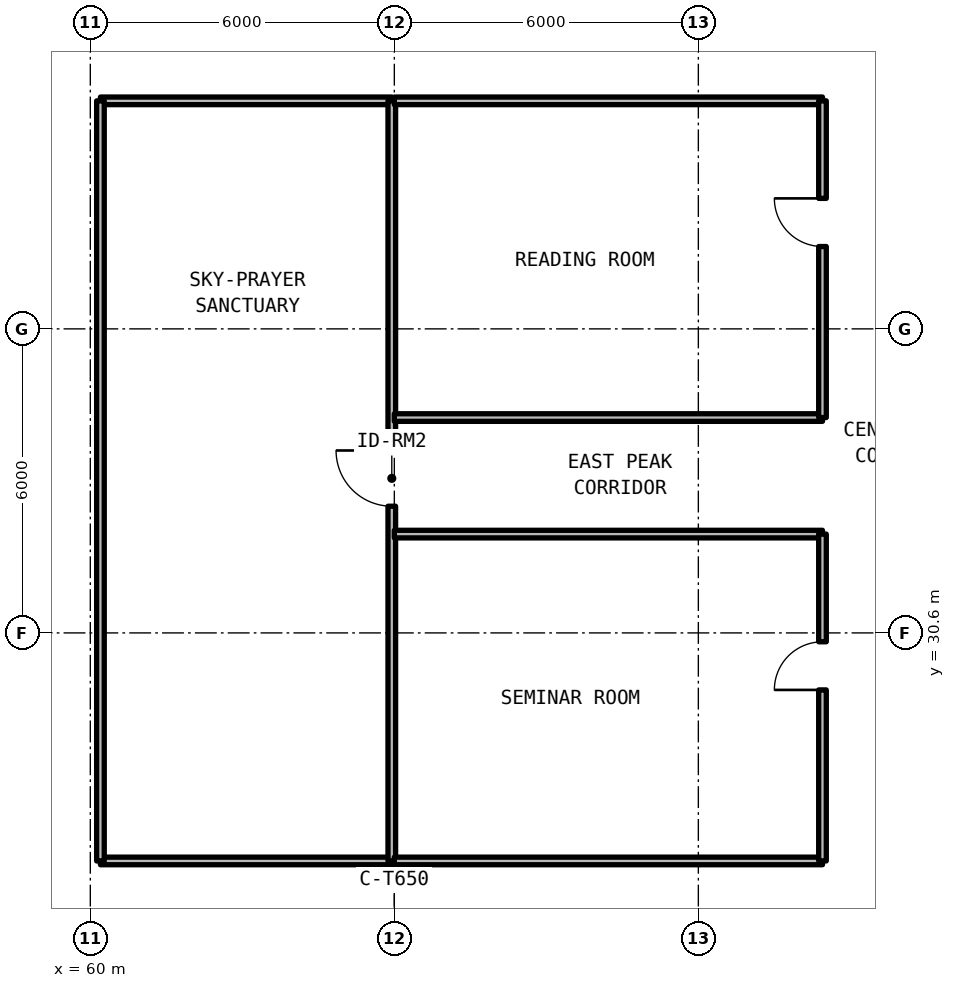
"""IFC4 building model, lengths in metres.
Left out: names, types, materials, properties, quantities, classifications, styles, units other than length and angle.
Written with IfcOpenShell. Run it as: python <this file> out.ifc"""

import sys

from ifc_helpers import new_model, si_unit, direction, frame, frame_2d, origin, place, context, subcontext, project, spatial, rectangle, extrude, element, fill, save


model = new_model("IFC4")
c1 = context("Model", 3, precision=1e-05, world=origin(), true_north=direction((0.0, 1.0)))
c2 = subcontext(c1, "Body", "Model", "MODEL_VIEW")
j1 = project(units=[si_unit("LENGTHUNIT", "METRE"), si_unit("PLANEANGLEUNIT", "RADIAN")], contexts=[c1])
p1 = place(None, origin())
s1 = spatial("IfcSite", under=j1, at=p1, CompositionType="ELEMENT")
p2 = place(p1, origin())
s2 = spatial("IfcBuilding", under=s1, at=p2, CompositionType="ELEMENT")
p3 = place(p2, frame((0.0, 0.0, 246.18)))
s3 = spatial("IfcBuildingStorey", under=s2, at=p3, CompositionType="ELEMENT", Elevation=246.18)
for number, where, z_axis, x_axis in (
    (1, (60.2, 26.1, 0.0), (0.0, 0.0, 1.0), (1.0, 0.0, 0.0)),
    (2, (60.2, 41.1, 0.0), (0.0, 0.0, 1.0), (1.0, 0.0, 0.0)),
):
    element("IfcWall", number, at=place(p3, frame(where, z_axis=z_axis, x_axis=x_axis)), inside=s3, PredefinedType="SOLIDWALL", context=c2, shape_type="SweptSolid", body=[
        extrude(rectangle(XDim=5.75, YDim=0.15, at=frame_2d((2.875, 0.0))), origin(), (0.0, 0.0, 1.0), 2.63),
    ])
p4 = place(p3, frame((60.2, 26.1, 0.0), z_axis=(0.0, 0.0, 1.0), x_axis=(0.0, 1.0, 0.0)))
e3 = element("IfcWall", 3, at=p4, inside=s3, PredefinedType="SOLIDWALL", context=c2, shape_type="SweptSolid", body=[
    extrude(rectangle(XDim=15.0, YDim=0.15, at=frame_2d((7.5, 0.0))), origin(), (0.0, 0.0, 1.0), 2.63),
])
p5 = place(p3, frame((65.95, 26.1, 0.0), z_axis=(0.0, 0.0, 1.0), x_axis=(0.0, 1.0, 0.0)))
e4 = element("IfcWall", 4, at=p5, inside=s3, PredefinedType="SOLIDWALL", context=c2, shape_type="SweptSolid", body=[
    extrude(rectangle(XDim=15.0, YDim=0.15, at=frame_2d((7.5, 0.0))), origin(), (0.0, 0.0, 1.0), 2.63),
])
p6 = place(p5, frame((7.0, 0.0, 0.0)))
e5 = element("IfcOpeningElement", 5, at=p6, cuts=e4, PredefinedType="OPENING", context=c2, shape_type="SweptSolid", body=[
    extrude(rectangle(XDim=1.1, YDim=2.15, at=frame_2d((0.55, 1.075))), frame((0.0, 0.085, 0.0), z_axis=(0.0, -1.0, 0.0), x_axis=(1.0, 0.0, 0.0)), (0.0, 0.0, 1.0), 0.17),
])
for number, where, z_axis, x_axis in (
    (6, (66.0, 26.1, 0.0), (0.0, 0.0, 1.0), (1.0, 0.0, 0.0)),
    (7, (66.0, 32.55, 0.0), (0.0, 0.0, 1.0), (1.0, 0.0, 0.0)),
):
    element("IfcWall", number, at=place(p3, frame(where, z_axis=z_axis, x_axis=x_axis)), inside=s3, PredefinedType="SOLIDWALL", context=c2, shape_type="SweptSolid", body=[
        extrude(rectangle(XDim=8.45, YDim=0.15, at=frame_2d((4.225, 0.0))), origin(), (0.0, 0.0, 1.0), 2.63),
    ])
p7 = place(p3, frame((74.45, 26.1, 0.0), z_axis=(0.0, 0.0, 1.0), x_axis=(0.0, 1.0, 0.0)))
e8 = element("IfcWall", 8, at=p7, inside=s3, PredefinedType="SOLIDWALL", context=c2, shape_type="SweptSolid", body=[
    extrude(rectangle(XDim=6.45, YDim=0.15, at=frame_2d((3.225, 0.0))), origin(), (0.0, 0.0, 1.0), 2.63),
])
p8 = place(p7, frame((3.375, 0.0, 0.0)))
e9 = element("IfcOpeningElement", 9, at=p8, cuts=e8, PredefinedType="OPENING", context=c2, shape_type="SweptSolid", body=[
    extrude(rectangle(XDim=0.95, YDim=2.15, at=frame_2d((0.475, 1.075))), frame((0.0, 0.085, 0.0), z_axis=(0.0, -1.0, 0.0), x_axis=(1.0, 0.0, 0.0)), (0.0, 0.0, 1.0), 0.17),
])
for number, where, z_axis, x_axis in (
    (10, (66.0, 34.85, 0.0), (0.0, 0.0, 1.0), (1.0, 0.0, 0.0)),
    (11, (66.0, 41.1, 0.0), (0.0, 0.0, 1.0), (1.0, 0.0, 0.0)),
):
    element("IfcWall", number, at=place(p3, frame(where, z_axis=z_axis, x_axis=x_axis)), inside=s3, PredefinedType="SOLIDWALL", context=c2, shape_type="SweptSolid", body=[
        extrude(rectangle(XDim=8.45, YDim=0.15, at=frame_2d((4.225, 0.0))), origin(), (0.0, 0.0, 1.0), 2.63),
    ])
p9 = place(p3, frame((74.45, 34.85, 0.0), z_axis=(0.0, 0.0, 1.0), x_axis=(0.0, 1.0, 0.0)))
e12 = element("IfcWall", 12, at=p9, inside=s3, PredefinedType="SOLIDWALL", context=c2, shape_type="SweptSolid", body=[
    extrude(rectangle(XDim=6.25, YDim=0.15, at=frame_2d((3.125, 0.0))), origin(), (0.0, 0.0, 1.0), 2.63),
])
p10 = place(p9, frame((3.375, 0.0, 0.0)))
e13 = element("IfcOpeningElement", 13, at=p10, cuts=e12, PredefinedType="OPENING", context=c2, shape_type="SweptSolid", body=[
    extrude(rectangle(XDim=0.95, YDim=2.15, at=frame_2d((0.475, 1.075))), frame((0.0, 0.085, 0.0), z_axis=(0.0, -1.0, 0.0), x_axis=(1.0, 0.0, 0.0)), (0.0, 0.0, 1.0), 0.17),
])
p11 = place(p6, origin())
e14 = element("IfcDoor", 14, at=p11, inside=s3, OperationType="SINGLE_SWING_RIGHT", PredefinedType="DOOR", context=c2, shape_type="SweptSolid", body=[
    extrude(rectangle(XDim=1.1, YDim=2.15, at=frame_2d((0.55, 1.075))), frame((0.0, 0.025, 0.0), z_axis=(0.0, -1.0, 0.0), x_axis=(1.0, 0.0, 0.0)), (0.0, 0.0, 1.0), 0.05),
])
fill(e5, e14)
p12 = place(p8, origin())
e15 = element("IfcDoor", 15, at=p12, inside=s3, OperationType="SINGLE_SWING_LEFT", PredefinedType="DOOR", context=c2, shape_type="SweptSolid", body=[
    extrude(rectangle(XDim=0.95, YDim=2.15, at=frame_2d((0.475, 1.075))), frame((0.0, 0.025, 0.0), z_axis=(0.0, -1.0, 0.0), x_axis=(1.0, 0.0, 0.0)), (0.0, 0.0, 1.0), 0.05),
])
fill(e9, e15)
p13 = place(p10, origin())
e16 = element("IfcDoor", 16, at=p13, inside=s3, OperationType="SINGLE_SWING_RIGHT", PredefinedType="DOOR", context=c2, shape_type="SweptSolid", body=[
    extrude(rectangle(XDim=0.95, YDim=2.15, at=frame_2d((0.475, 1.075))), frame((0.0, 0.025, 0.0), z_axis=(0.0, -1.0, 0.0), x_axis=(1.0, 0.0, 0.0)), (0.0, 0.0, 1.0), 0.05),
])
fill(e13, e16)
save(model, sys.argv[1])
